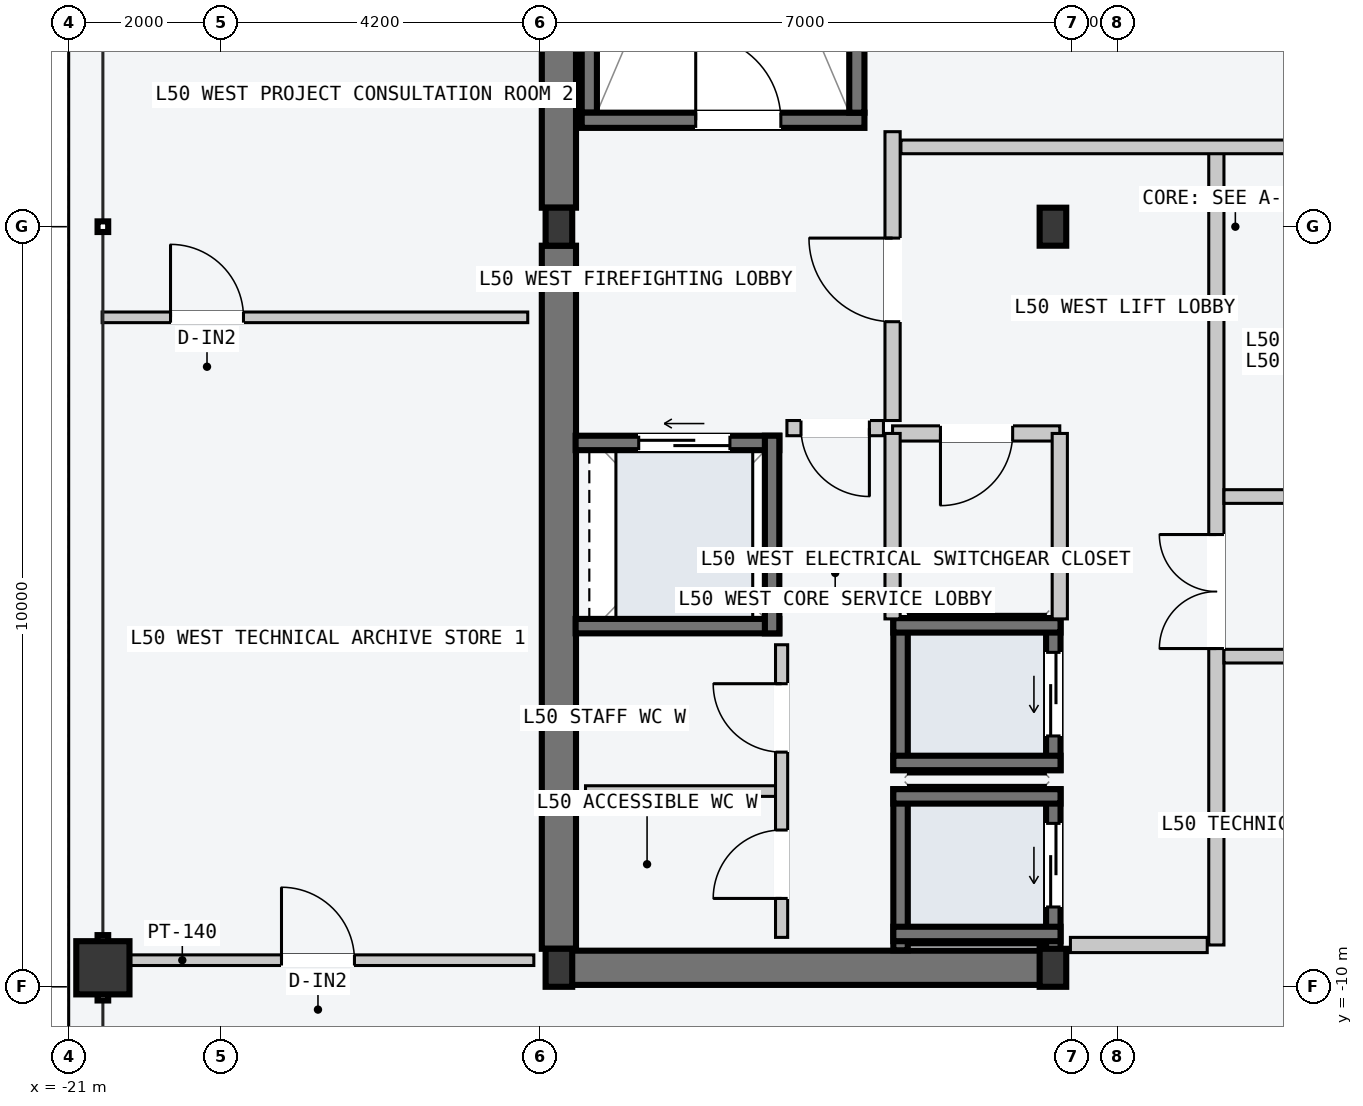
"""IFC4 building model, lengths in metres.
Left out: names, types, materials, properties, quantities, classifications, styles, units other than length and angle.
Written with IfcOpenShell. Run it as: python <this file> out.ifc"""

import sys

from ifc_helpers import new_model, si_unit, direction, frame, frame_2d, origin, origin_2d, place, context, subcontext, project, spatial, rectangle, hollow_rectangle, i_section, extrude, element, fill, save


model = new_model("IFC4")
c1 = context("Model", 3, precision=1e-05, world=origin(), true_north=direction((0.0, 1.0)))
c2 = subcontext(c1, "Body", "Model", "MODEL_VIEW")
j1 = project(units=[si_unit("LENGTHUNIT", "METRE"), si_unit("PLANEANGLEUNIT", "RADIAN")], contexts=[c1])
p1 = place(None, origin())
s1 = spatial("IfcSite", under=j1, at=p1, CompositionType="ELEMENT")
p2 = place(p1, origin())
s2 = spatial("IfcBuilding", under=s1, at=p2, CompositionType="ELEMENT")
p3 = place(p2, frame((0.0, 0.0, 191.1)))
s3 = spatial("IfcBuildingStorey", under=s2, at=p3, CompositionType="ELEMENT", Elevation=191.1)
p4 = place(p3, frame((-14.53, -9.75, -0.2), z_axis=(0.0, 0.0, 1.0), x_axis=(1.0, 0.0, 0.0)))
e1 = element("IfcWall", 1, at=p4, inside=s3, PredefinedType="SHEAR", context=c2, shape_type="SweptSolid", body=[
    extrude(rectangle(XDim=6.46, YDim=0.45, at=frame_2d((3.23, 0.0))), origin(), (0.0, 0.0, 1.0), 3.6),
])
for number, where, z_axis, x_axis in (
    (2, (-14.55, -9.5, -0.2), (0.0, 0.0, 1.0), (0.0, 1.0, 0.0)),
    (3, (-14.55, 0.25, -0.2), (0.0, 0.0, 1.0), (0.0, 1.0, 0.0)),
):
    element("IfcWall", number, at=place(p3, frame(where, z_axis=z_axis, x_axis=x_axis)), inside=s3, PredefinedType="SHEAR", context=c2, shape_type="SweptSolid", body=[
        extrude(rectangle(XDim=9.25, YDim=0.45, at=frame_2d((4.625, 0.0))), origin(), (0.0, 0.0, 1.0), 3.6),
    ])
p5 = place(p3, frame((-14.15, 1.5, -0.2), z_axis=(0.0, 0.0, 1.0), x_axis=(0.0, 1.0, 0.0)))
e4 = element("IfcWall", 4, at=p5, inside=s3, PredefinedType="SOLIDWALL", context=c2, shape_type="SweptSolid", body=[
    extrude(rectangle(XDim=7.8, YDim=0.2, at=frame_2d((3.9, 0.0))), origin(), (0.0, 0.0, 1.0), 3.6),
])
p6 = place(p3, frame((-14.25, 1.4, -0.2), z_axis=(0.0, 0.0, 1.0), x_axis=(1.0, 0.0, 0.0)))
e5 = element("IfcWall", 5, at=p6, inside=s3, PredefinedType="SOLIDWALL", context=c2, shape_type="SweptSolid", body=[
    extrude(rectangle(XDim=3.72, YDim=0.2, at=frame_2d((1.86, 0.0))), origin(), (0.0, 0.0, 1.0), 3.6),
])
p7 = place(p6, frame((1.5, 0.0, 0.2)))
e6 = element("IfcOpeningElement", 6, at=p7, cuts=e5, PredefinedType="OPENING", context=c2, shape_type="SweptSolid", body=[
    extrude(rectangle(XDim=1.12, YDim=2.18, at=frame_2d((0.56, 1.09))), frame((0.0, 0.11, 0.0), z_axis=(0.0, -1.0, 0.0), x_axis=(1.0, 0.0, 0.0)), (0.0, 0.0, 1.0), 0.22),
])
p8 = place(p3, frame((-10.63, 1.5, -0.2), z_axis=(0.0, 0.0, 1.0), x_axis=(0.0, 1.0, 0.0)))
e7 = element("IfcWall", 7, at=p8, inside=s3, PredefinedType="SOLIDWALL", context=c2, shape_type="SweptSolid", body=[
    extrude(rectangle(XDim=7.8, YDim=0.2, at=frame_2d((3.9, 0.0))), origin(), (0.0, 0.0, 1.0), 3.6),
])
for number, where, z_axis, x_axis in (
    (8, (-14.55, -9.75, 0.0), (0.0, 0.0, 1.0), (1.0, 0.0, 0.0)),
    (9, (-14.55, 0.0, 0.0), (0.0, 0.0, 1.0), (1.0, 0.0, 0.0)),
    (10, (-8.05, -9.75, 0.0), (0.0, 0.0, 1.0), (1.0, 0.0, 0.0)),
    (11, (-8.05, 0.0, 0.0), (0.0, 0.0, 1.0), (1.0, 0.0, 0.0)),
):
    element("IfcColumn", number, at=place(p3, frame(where, z_axis=z_axis, x_axis=x_axis)), inside=s3, PredefinedType="COLUMN", context=c2, shape_type="SweptSolid", body=[
        extrude(i_section(OverallWidth=0.35, OverallDepth=0.5, WebThickness=0.02, FlangeThickness=0.032, at=origin_2d()), origin(), (0.0, 0.0, 1.0), 3.6),
    ])
p9 = place(p3, frame((-20.55, -9.75, 0.0), z_axis=(0.0, 0.0, 1.0), x_axis=(0.0, 1.0, 0.0)))
e12 = element("IfcColumn", 12, at=p9, inside=s3, PredefinedType="COLUMN", context=c2, shape_type="SweptSolid", body=[
    extrude(hollow_rectangle(XDim=0.7, YDim=0.7, WallThickness=0.03, at=origin_2d()), origin(), (0.0, 0.0, 1.0), 3.6),
])
p10 = place(p3, frame((-8.045, -9.52, -0.2), z_axis=(0.0, 0.0, 1.0), x_axis=(0.0, 1.0, 0.0)))
e13 = element("IfcWall", 13, at=p10, inside=s3, PredefinedType="SOLIDWALL", context=c2, shape_type="SweptSolid", body=[
    extrude(rectangle(XDim=2.12, YDim=0.19, at=frame_2d((1.06, 0.0))), origin(), (0.0, 0.0, 1.0), 3.6),
])
p11 = place(p10, frame((0.57, 0.0, 0.2)))
e14 = element("IfcOpeningElement", 14, at=p11, cuts=e13, PredefinedType="OPENING", context=c2, shape_type="SweptSolid", body=[
    extrude(rectangle(XDim=1.1, YDim=2.2, at=frame_2d((0.55, 1.1))), frame((0.0, 0.105, 0.0), z_axis=(0.0, -1.0, 0.0), x_axis=(1.0, 0.0, 0.0)), (0.0, 0.0, 1.0), 0.21),
])
p12 = place(p3, frame((-10.055, -9.52, -0.2), z_axis=(0.0, 0.0, 1.0), x_axis=(0.0, 1.0, 0.0)))
e15 = element("IfcWall", 15, at=p12, inside=s3, PredefinedType="SOLIDWALL", context=c2, shape_type="SweptSolid", body=[
    extrude(rectangle(XDim=2.12, YDim=0.19, at=frame_2d((1.06, 0.0))), origin(), (0.0, 0.0, 1.0), 3.6),
])
for number, where, z_axis, x_axis in (
    (16, (-10.15, -7.495, -0.2), (0.0, 0.0, 1.0), (1.0, 0.0, 0.0)),
    (17, (-10.15, -9.305, -0.2), (0.0, 0.0, 1.0), (1.0, 0.0, 0.0)),
):
    element("IfcWall", number, at=place(p3, frame(where, z_axis=z_axis, x_axis=x_axis)), inside=s3, PredefinedType="SOLIDWALL", context=c2, shape_type="SweptSolid", body=[
        extrude(rectangle(XDim=2.2, YDim=0.19, at=frame_2d((1.1, 0.0))), origin(), (0.0, 0.0, 1.0), 3.6),
    ])
p13 = place(p3, frame((-8.045, -7.15, -0.2), z_axis=(0.0, 0.0, 1.0), x_axis=(0.0, 1.0, 0.0)))
e18 = element("IfcWall", 18, at=p13, inside=s3, PredefinedType="SOLIDWALL", context=c2, shape_type="SweptSolid", body=[
    extrude(rectangle(XDim=2.0, YDim=0.19, at=frame_2d((1.0, 0.0))), origin(), (0.0, 0.0, 1.0), 3.6),
])
p14 = place(p13, frame((0.45, 0.0, 0.2)))
e19 = element("IfcOpeningElement", 19, at=p14, cuts=e18, PredefinedType="OPENING", context=c2, shape_type="SweptSolid", body=[
    extrude(rectangle(XDim=1.1, YDim=2.2, at=frame_2d((0.55, 1.1))), frame((0.0, 0.105, 0.0), z_axis=(0.0, -1.0, 0.0), x_axis=(1.0, 0.0, 0.0)), (0.0, 0.0, 1.0), 0.21),
])
p15 = place(p3, frame((-10.055, -7.15, -0.2), z_axis=(0.0, 0.0, 1.0), x_axis=(0.0, 1.0, 0.0)))
e20 = element("IfcWall", 20, at=p15, inside=s3, PredefinedType="SOLIDWALL", context=c2, shape_type="SweptSolid", body=[
    extrude(rectangle(XDim=2.0, YDim=0.19, at=frame_2d((1.0, 0.0))), origin(), (0.0, 0.0, 1.0), 3.6),
])
for number, where, z_axis, x_axis in (
    (21, (-10.15, -5.245, -0.2), (0.0, 0.0, 1.0), (1.0, 0.0, 0.0)),
    (22, (-10.15, -7.055, -0.2), (0.0, 0.0, 1.0), (1.0, 0.0, 0.0)),
):
    element("IfcWall", number, at=place(p3, frame(where, z_axis=z_axis, x_axis=x_axis)), inside=s3, PredefinedType="SOLIDWALL", context=c2, shape_type="SweptSolid", body=[
        extrude(rectangle(XDim=2.2, YDim=0.19, at=frame_2d((1.1, 0.0))), origin(), (0.0, 0.0, 1.0), 3.6),
    ])
p16 = place(p3, frame((-14.33, -2.845, -0.2), z_axis=(0.0, 0.0, 1.0), x_axis=(1.0, 0.0, 0.0)))
e23 = element("IfcWall", 23, at=p16, inside=s3, PredefinedType="SOLIDWALL", context=c2, shape_type="SweptSolid", body=[
    extrude(rectangle(XDim=2.68, YDim=0.19, at=frame_2d((1.34, 0.0))), origin(), (0.0, 0.0, 1.0), 3.6),
])
p17 = place(p16, frame((0.83, 0.0, 0.2)))
e24 = element("IfcOpeningElement", 24, at=p17, cuts=e23, PredefinedType="OPENING", context=c2, shape_type="SweptSolid", body=[
    extrude(rectangle(XDim=1.2, YDim=2.2, at=frame_2d((0.6, 1.1))), frame((0.0, 0.105, 0.0), z_axis=(0.0, -1.0, 0.0), x_axis=(1.0, 0.0, 0.0)), (0.0, 0.0, 1.0), 0.21),
])
p18 = place(p3, frame((-14.33, -5.255, -0.2), z_axis=(0.0, 0.0, 1.0), x_axis=(1.0, 0.0, 0.0)))
e25 = element("IfcWall", 25, at=p18, inside=s3, PredefinedType="SOLIDWALL", context=c2, shape_type="SweptSolid", body=[
    extrude(rectangle(XDim=2.68, YDim=0.19, at=frame_2d((1.34, 0.0))), origin(), (0.0, 0.0, 1.0), 3.6),
])
p19 = place(p3, frame((-11.745, -5.35, -0.2), z_axis=(0.0, 0.0, 1.0), x_axis=(0.0, 1.0, 0.0)))
e26 = element("IfcWall", 26, at=p19, inside=s3, PredefinedType="SOLIDWALL", context=c2, shape_type="SweptSolid", body=[
    extrude(rectangle(XDim=2.6, YDim=0.19, at=frame_2d((1.3, 0.0))), origin(), (0.0, 0.0, 1.0), 3.6),
])
p20 = place(p3, frame((-5.9, -9.45, 0.0), z_axis=(0.0, 0.0, 1.0), x_axis=(0.0, 1.0, 0.0)))
e27 = element("IfcWall", 27, at=p20, inside=s3, PredefinedType="PARTITIONING", context=c2, shape_type="SweptSolid", body=[
    extrude(rectangle(XDim=10.5, YDim=0.2, at=frame_2d((5.25, 0.0))), origin(), (0.0, 0.0, 1.0), 3.4),
])
p21 = place(p20, frame((3.9, 0.0, 0.0)))
e28 = element("IfcOpeningElement", 28, at=p21, cuts=e27, PredefinedType="OPENING", context=c2, shape_type="SweptSolid", body=[
    extrude(rectangle(XDim=1.5, YDim=2.2, at=frame_2d((0.75, 1.1))), frame((0.0, 0.11, 0.0), z_axis=(0.0, -1.0, 0.0), x_axis=(1.0, 0.0, 0.0)), (0.0, 0.0, 1.0), 0.22),
])
p22 = place(p3, frame((-6.02, -9.45, 0.0), z_axis=(0.0, 0.0, 1.0), x_axis=(-1.0, 0.0, 0.0)))
e29 = element("IfcWall", 29, at=p22, inside=s3, PredefinedType="PARTITIONING", context=c2, shape_type="SweptSolid", body=[
    extrude(rectangle(XDim=1.8, YDim=0.2, at=frame_2d((0.9, 0.0))), origin(), (0.0, 0.0, 1.0), 3.4),
])
p23 = place(p3, frame((-10.16, -2.55, 0.0), z_axis=(0.0, 0.0, 1.0), x_axis=(0.0, 1.0, 0.0)))
e30 = element("IfcWall", 30, at=p23, inside=s3, PredefinedType="PARTITIONING", context=c2, shape_type="SweptSolid", body=[
    extrude(rectangle(XDim=3.8, YDim=0.2, at=frame_2d((1.9, 0.0))), origin(), (0.0, 0.0, 1.0), 3.4),
])
p24 = place(p23, frame((1.3, 0.0, 0.0)))
e31 = element("IfcOpeningElement", 31, at=p24, cuts=e30, PredefinedType="OPENING", context=c2, shape_type="SweptSolid", body=[
    extrude(rectangle(XDim=1.1, YDim=2.15, at=frame_2d((0.55, 1.075))), frame((0.0, 0.11, 0.0), z_axis=(0.0, -1.0, 0.0), x_axis=(1.0, 0.0, 0.0)), (0.0, 0.0, 1.0), 0.22),
])
p25 = place(p3, frame((-10.28, -2.65, 0.0), z_axis=(0.0, 0.0, 1.0), x_axis=(-1.0, 0.0, 0.0)))
e32 = element("IfcWall", 32, at=p25, inside=s3, PredefinedType="PARTITIONING", context=c2, shape_type="SweptSolid", body=[
    extrude(rectangle(XDim=1.27, YDim=0.2, at=frame_2d((0.635, 0.0))), origin(), (0.0, 0.0, 1.0), 3.4),
])
p26 = place(p25, frame((0.185, 0.0, 0.0)))
e33 = element("IfcOpeningElement", 33, at=p26, cuts=e32, PredefinedType="OPENING", context=c2, shape_type="SweptSolid", body=[
    extrude(rectangle(XDim=0.9, YDim=2.15, at=frame_2d((0.45, 1.075))), frame((0.0, 0.11, 0.0), z_axis=(0.0, -1.0, 0.0), x_axis=(1.0, 0.0, 0.0)), (0.0, 0.0, 1.0), 0.22),
])
p27 = place(p3, frame((-7.96, -2.72, 0.0), z_axis=(0.0, 0.0, 1.0), x_axis=(-1.0, 0.0, 0.0)))
e34 = element("IfcWall", 34, at=p27, inside=s3, PredefinedType="PARTITIONING", context=c2, shape_type="SweptSolid", body=[
    extrude(rectangle(XDim=2.2, YDim=0.2, at=frame_2d((1.1, 0.0))), origin(), (0.0, 0.0, 1.0), 3.4),
])
p28 = place(p27, frame((0.62, 0.0, 0.0)))
e35 = element("IfcOpeningElement", 35, at=p28, cuts=e34, PredefinedType="OPENING", context=c2, shape_type="SweptSolid", body=[
    extrude(rectangle(XDim=0.95, YDim=2.1, at=frame_2d((0.475, 1.05))), frame((0.0, 0.11, 0.0), z_axis=(0.0, -1.0, 0.0), x_axis=(1.0, 0.0, 0.0)), (0.0, 0.0, 1.0), 0.22),
])
for number, where, z_axis, x_axis in (
    (36, (-7.96, -5.16, 0.0), (0.0, 0.0, 1.0), (0.0, 1.0, 0.0)),
    (37, (-10.16, -5.16, 0.0), (0.0, 0.0, 1.0), (0.0, 1.0, 0.0)),
):
    element("IfcWall", number, at=place(p3, frame(where, z_axis=z_axis, x_axis=x_axis)), inside=s3, PredefinedType="PARTITIONING", context=c2, shape_type="SweptSolid", body=[
        extrude(rectangle(XDim=2.44, YDim=0.2, at=frame_2d((1.22, 0.0))), origin(), (0.0, 0.0, 1.0), 3.4),
    ])
p29 = place(p3, frame((-11.7, -7.425, 0.0), z_axis=(0.0, 0.0, 1.0), x_axis=(-1.0, 0.0, 0.0)))
e38 = element("IfcWall", 38, at=p29, inside=s3, PredefinedType="PARTITIONING", context=c2, shape_type="SweptSolid", body=[
    extrude(rectangle(XDim=2.5, YDim=0.14, at=frame_2d((1.25, 0.0))), origin(), (0.0, 0.0, 1.0), 3.4),
])
p30 = place(p3, frame((-11.62, -9.35, 0.0), z_axis=(0.0, 0.0, 1.0), x_axis=(0.0, 1.0, 0.0)))
e39 = element("IfcWall", 39, at=p30, inside=s3, PredefinedType="PARTITIONING", context=c2, shape_type="SweptSolid", body=[
    extrude(rectangle(XDim=3.85, YDim=0.16, at=frame_2d((1.925, 0.0))), origin(), (0.0, 0.0, 1.0), 3.4),
])
p31 = place(p30, frame((0.512, 0.0, 0.0)))
e40 = element("IfcOpeningElement", 40, at=p31, cuts=e39, PredefinedType="OPENING", context=c2, shape_type="SweptSolid", body=[
    extrude(rectangle(XDim=0.9, YDim=2.15, at=frame_2d((0.45, 1.075))), frame((0.0, 0.09, 0.0), z_axis=(0.0, -1.0, 0.0), x_axis=(1.0, 0.0, 0.0)), (0.0, 0.0, 1.0), 0.18),
])
p32 = place(p30, frame((2.438, 0.0, 0.0)))
e41 = element("IfcOpeningElement", 41, at=p32, cuts=e39, PredefinedType="OPENING", context=c2, shape_type="SweptSolid", body=[
    extrude(rectangle(XDim=0.9, YDim=2.15, at=frame_2d((0.45, 1.075))), frame((0.0, 0.09, 0.0), z_axis=(0.0, -1.0, 0.0), x_axis=(1.0, 0.0, 0.0)), (0.0, 0.0, 1.0), 0.18),
])
p33 = place(p3, frame((-10.05, 1.05, 0.0), z_axis=(0.0, 0.0, 1.0), x_axis=(1.0, 0.0, 0.0)))
e42 = element("IfcWall", 42, at=p33, inside=s3, PredefinedType="PARTITIONING", context=c2, shape_type="SweptSolid", body=[
    extrude(rectangle(XDim=8.79, YDim=0.18, at=frame_2d((4.395, 0.0))), origin(), (0.0, 0.0, 1.0), 3.4),
])
for number, where, z_axis, x_axis in (
    (43, (-5.8, -3.55, 0.0), (0.0, 0.0, 1.0), (1.0, 0.0, 0.0)),
    (44, (-5.8, -5.65, 0.0), (0.0, 0.0, 1.0), (1.0, 0.0, 0.0)),
):
    element("IfcWall", number, at=place(p3, frame(where, z_axis=z_axis, x_axis=x_axis)), inside=s3, PredefinedType="PARTITIONING", context=c2, shape_type="SweptSolid", body=[
        extrude(rectangle(XDim=4.54, YDim=0.18, at=frame_2d((2.27, 0.0))), origin(), (0.0, 0.0, 1.0), 3.4),
    ])
p34 = place(p3, frame((-20.56, -9.65, 0.0), z_axis=(0.0, 0.0, 1.0), x_axis=(1.0, 0.0, 0.0)))
e45 = element("IfcWall", 45, at=p34, inside=s3, PredefinedType="PARTITIONING", context=c2, shape_type="SweptSolid", body=[
    extrude(rectangle(XDim=5.68, YDim=0.14, at=frame_2d((2.84, 0.0))), origin(), (0.0, 0.0, 1.0), 2.75),
])
p35 = place(p34, frame((2.36, 0.0, 0.0)))
e46 = element("IfcOpeningElement", 46, at=p35, cuts=e45, PredefinedType="OPENING", context=c2, shape_type="SweptSolid", body=[
    extrude(rectangle(XDim=0.96, YDim=2.18, at=frame_2d((0.48, 1.09))), frame((0.0, 0.08, 0.0), z_axis=(0.0, -1.0, 0.0), x_axis=(1.0, 0.0, 0.0)), (0.0, 0.0, 1.0), 0.16),
])
p36 = place(p3, frame((-20.56, -1.192, 0.0), z_axis=(0.0, 0.0, 1.0), x_axis=(1.0, 0.0, 0.0)))
e47 = element("IfcWall", 47, at=p36, inside=s3, PredefinedType="PARTITIONING", context=c2, shape_type="SweptSolid", body=[
    extrude(rectangle(XDim=5.6, YDim=0.14, at=frame_2d((2.8, 0.0))), origin(), (0.0, 0.0, 1.0), 3.4),
])
p37 = place(p36, frame((0.9, 0.0, 0.0)))
e48 = element("IfcOpeningElement", 48, at=p37, cuts=e47, PredefinedType="OPENING", context=c2, shape_type="SweptSolid", body=[
    extrude(rectangle(XDim=0.96, YDim=2.18, at=frame_2d((0.48, 1.09))), frame((0.0, 0.08, 0.0), z_axis=(0.0, -1.0, 0.0), x_axis=(1.0, 0.0, 0.0)), (0.0, 0.0, 1.0), 0.16),
])
p38 = place(p7, origin())
e49 = element("IfcDoor", 49, at=p38, inside=s3, OperationType="SINGLE_SWING_LEFT", PredefinedType="DOOR", context=c2, shape_type="SweptSolid", body=[
    extrude(rectangle(XDim=1.12, YDim=2.18, at=frame_2d((0.56, 1.09))), frame((0.0, 0.025, 0.0), z_axis=(0.0, -1.0, 0.0), x_axis=(1.0, 0.0, 0.0)), (0.0, 0.0, 1.0), 0.05),
])
fill(e6, e49)
p39 = place(p11, origin())
e50 = element("IfcDoor", 50, at=p39, inside=s3, OperationType="SLIDING_TO_LEFT", PredefinedType="DOOR", context=c2, shape_type="SweptSolid", body=[
    extrude(rectangle(XDim=1.1, YDim=2.2, at=frame_2d((0.55, 1.1))), frame((0.0, 0.025, 0.0), z_axis=(0.0, -1.0, 0.0), x_axis=(1.0, 0.0, 0.0)), (0.0, 0.0, 1.0), 0.05),
])
fill(e14, e50)
p40 = place(p14, origin())
e51 = element("IfcDoor", 51, at=p40, inside=s3, OperationType="SLIDING_TO_LEFT", PredefinedType="DOOR", context=c2, shape_type="SweptSolid", body=[
    extrude(rectangle(XDim=1.1, YDim=2.2, at=frame_2d((0.55, 1.1))), frame((0.0, 0.025, 0.0), z_axis=(0.0, -1.0, 0.0), x_axis=(1.0, 0.0, 0.0)), (0.0, 0.0, 1.0), 0.05),
])
fill(e19, e51)
p41 = place(p17, origin())
e52 = element("IfcDoor", 52, at=p41, inside=s3, OperationType="SLIDING_TO_LEFT", PredefinedType="DOOR", context=c2, shape_type="SweptSolid", body=[
    extrude(rectangle(XDim=1.2, YDim=2.2, at=frame_2d((0.6, 1.1))), frame((0.0, 0.025, 0.0), z_axis=(0.0, -1.0, 0.0), x_axis=(1.0, 0.0, 0.0)), (0.0, 0.0, 1.0), 0.05),
])
fill(e24, e52)
p42 = place(p21, origin())
e53 = element("IfcDoor", 53, at=p42, inside=s3, OperationType="DOUBLE_DOOR_SINGLE_SWING", PredefinedType="DOOR", context=c2, shape_type="SweptSolid", body=[
    extrude(rectangle(XDim=1.5, YDim=2.2, at=frame_2d((0.75, 1.1))), frame((0.0, 0.025, 0.0), z_axis=(0.0, -1.0, 0.0), x_axis=(1.0, 0.0, 0.0)), (0.0, 0.0, 1.0), 0.05),
])
fill(e28, e53)
p43 = place(p24, origin())
e54 = element("IfcDoor", 54, at=p43, inside=s3, OperationType="SINGLE_SWING_RIGHT", PredefinedType="DOOR", context=c2, shape_type="SweptSolid", body=[
    extrude(rectangle(XDim=1.1, YDim=2.15, at=frame_2d((0.55, 1.075))), frame((0.0, 0.025, 0.0), z_axis=(0.0, -1.0, 0.0), x_axis=(1.0, 0.0, 0.0)), (0.0, 0.0, 1.0), 0.05),
])
fill(e31, e54)
p44 = place(p26, origin())
e55 = element("IfcDoor", 55, at=p44, inside=s3, OperationType="SINGLE_SWING_LEFT", PredefinedType="DOOR", context=c2, shape_type="SweptSolid", body=[
    extrude(rectangle(XDim=0.9, YDim=2.15, at=frame_2d((0.45, 1.075))), frame((0.0, 0.025, 0.0), z_axis=(0.0, -1.0, 0.0), x_axis=(1.0, 0.0, 0.0)), (0.0, 0.0, 1.0), 0.05),
])
fill(e33, e55)
p45 = place(p28, origin())
e56 = element("IfcDoor", 56, at=p45, inside=s3, OperationType="SINGLE_SWING_RIGHT", PredefinedType="DOOR", context=c2, shape_type="SweptSolid", body=[
    extrude(rectangle(XDim=0.95, YDim=2.1, at=frame_2d((0.475, 1.05))), frame((0.0, 0.025, 0.0), z_axis=(0.0, -1.0, 0.0), x_axis=(1.0, 0.0, 0.0)), (0.0, 0.0, 1.0), 0.05),
])
fill(e35, e56)
p46 = place(p31, origin())
e57 = element("IfcDoor", 57, at=p46, inside=s3, OperationType="SINGLE_SWING_LEFT", PredefinedType="DOOR", context=c2, shape_type="SweptSolid", body=[
    extrude(rectangle(XDim=0.9, YDim=2.15, at=frame_2d((0.45, 1.075))), frame((0.0, 0.025, 0.0), z_axis=(0.0, -1.0, 0.0), x_axis=(1.0, 0.0, 0.0)), (0.0, 0.0, 1.0), 0.05),
])
fill(e40, e57)
p47 = place(p32, origin())
e58 = element("IfcDoor", 58, at=p47, inside=s3, OperationType="SINGLE_SWING_RIGHT", PredefinedType="DOOR", context=c2, shape_type="SweptSolid", body=[
    extrude(rectangle(XDim=0.9, YDim=2.15, at=frame_2d((0.45, 1.075))), frame((0.0, 0.025, 0.0), z_axis=(0.0, -1.0, 0.0), x_axis=(1.0, 0.0, 0.0)), (0.0, 0.0, 1.0), 0.05),
])
fill(e41, e58)
p48 = place(p35, origin())
e59 = element("IfcDoor", 59, at=p48, inside=s3, OperationType="SINGLE_SWING_LEFT", PredefinedType="DOOR", context=c2, shape_type="SweptSolid", body=[
    extrude(rectangle(XDim=0.96, YDim=2.18, at=frame_2d((0.48, 1.09))), frame((0.0, 0.025, 0.0), z_axis=(0.0, -1.0, 0.0), x_axis=(1.0, 0.0, 0.0)), (0.0, 0.0, 1.0), 0.05),
])
fill(e46, e59)
p49 = place(p37, origin())
e60 = element("IfcDoor", 60, at=p49, inside=s3, OperationType="SINGLE_SWING_LEFT", PredefinedType="DOOR", context=c2, shape_type="SweptSolid", body=[
    extrude(rectangle(XDim=0.96, YDim=2.18, at=frame_2d((0.48, 1.09))), frame((0.0, 0.025, 0.0), z_axis=(0.0, -1.0, 0.0), x_axis=(1.0, 0.0, 0.0)), (0.0, 0.0, 1.0), 0.05),
])
fill(e48, e60)
save(model, sys.argv[1])
